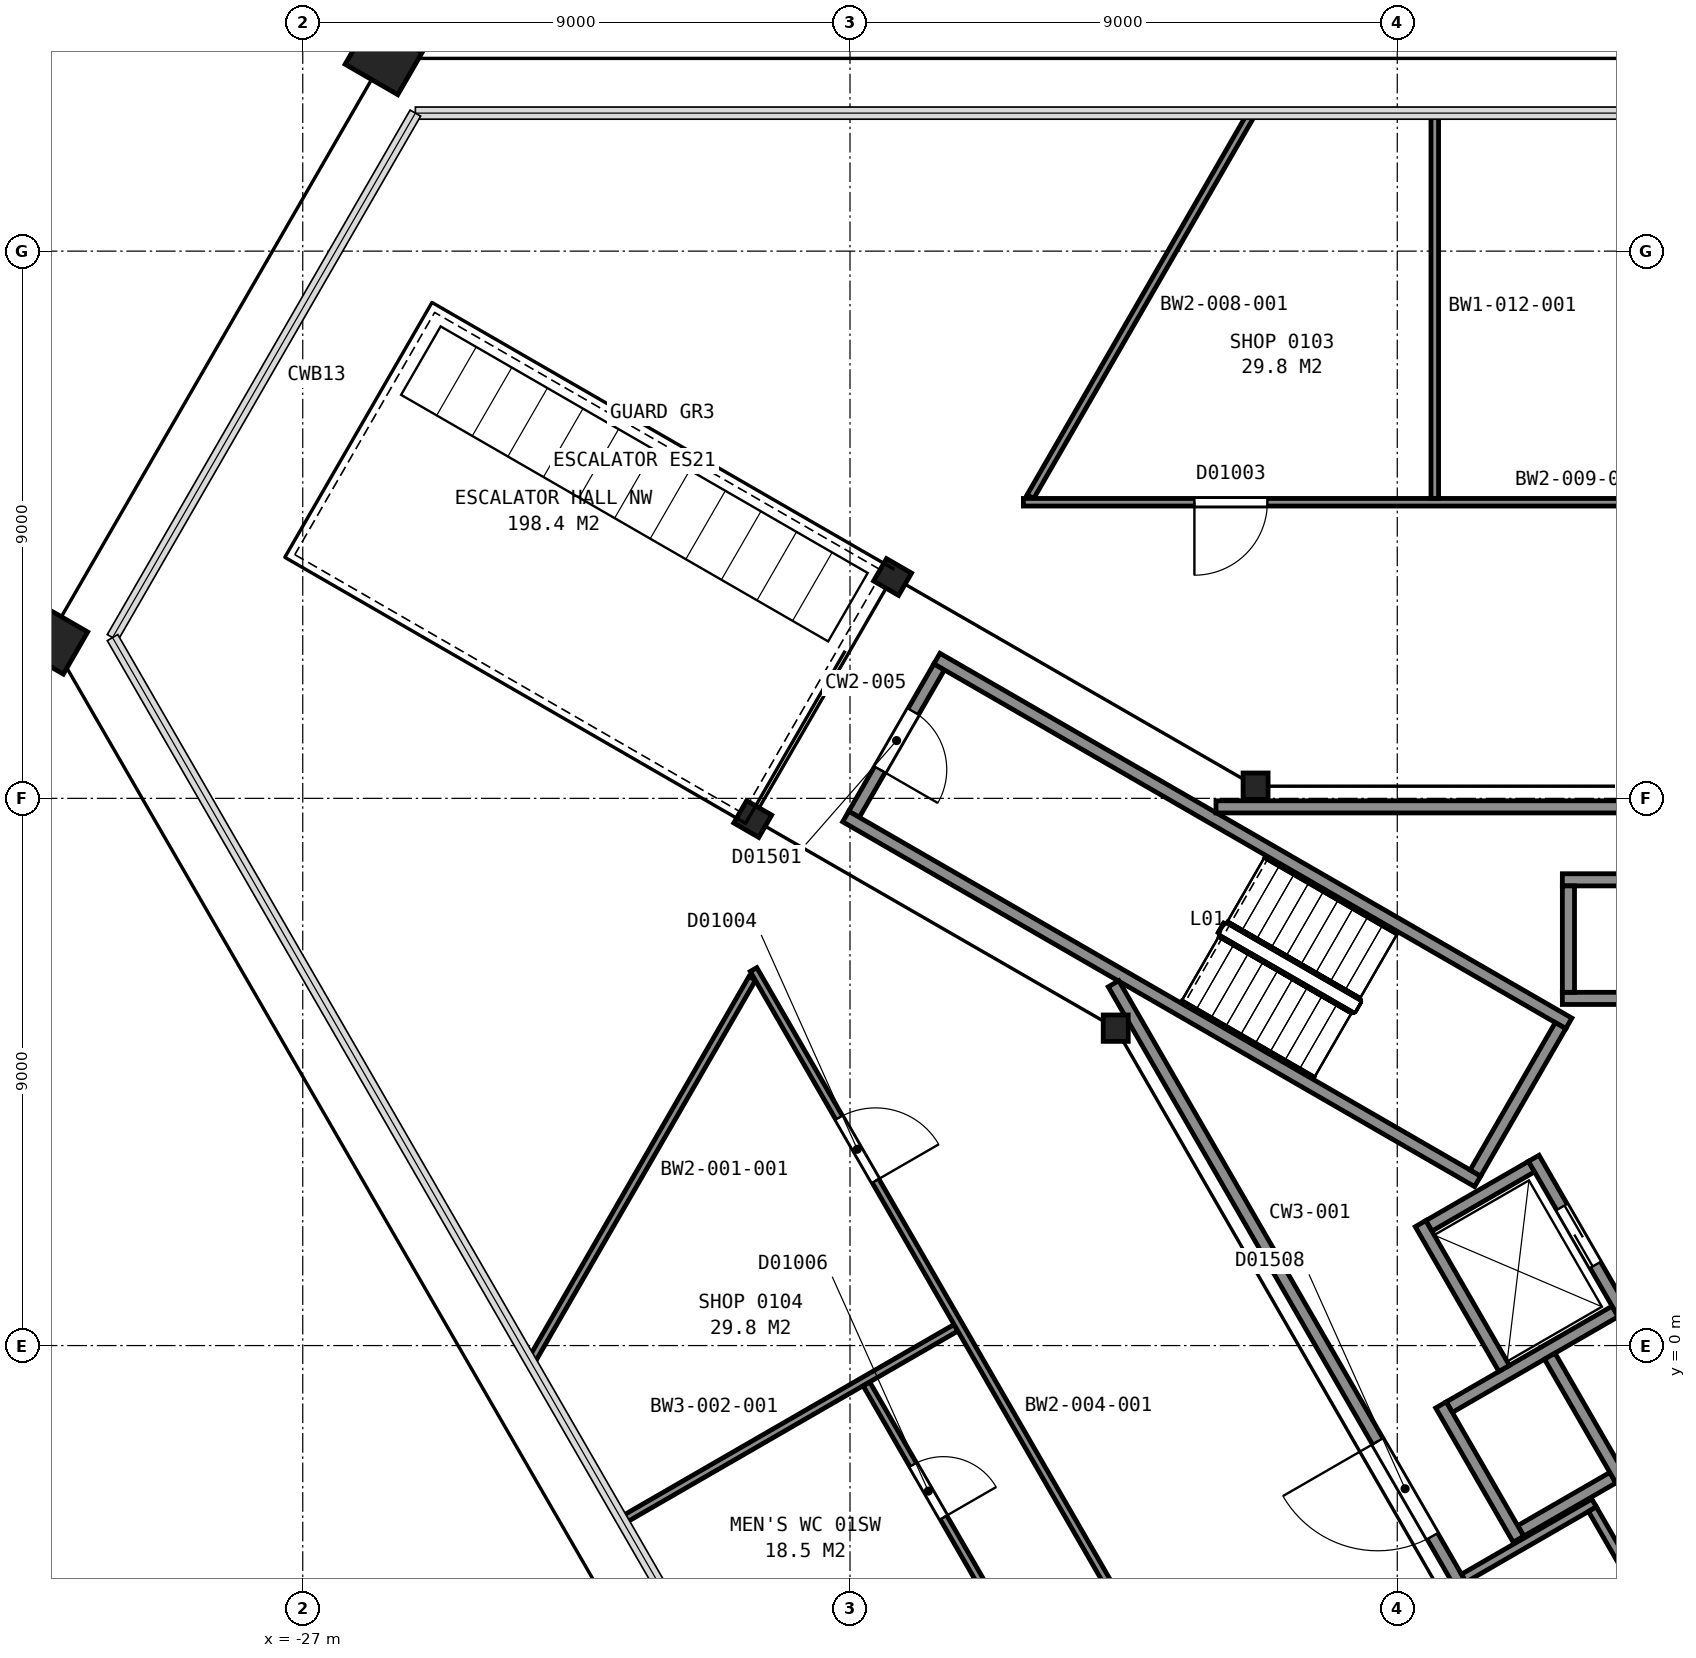
"""IFC4 building model, lengths in metres.
Left out: names, types, materials, properties, quantities, classifications, styles, units other than length and angle.
Written with IfcOpenShell. Run it as: python <this file> out.ifc"""

import sys

from ifc_helpers import new_model, si_unit, direction, frame, frame_2d, origin, origin_2d, place, context, subcontext, project, spatial, rectangle, hollow_rectangle, i_section, extrude, element, fill, save


model = new_model("IFC4")
c1 = context("Model", 3, precision=1e-05, world=origin(), true_north=direction((0.0, 1.0)))
c2 = subcontext(c1, "Body", "Model", "MODEL_VIEW")
j1 = project(units=[si_unit("LENGTHUNIT", "METRE"), si_unit("PLANEANGLEUNIT", "RADIAN")], contexts=[c1])
p1 = place(None, origin())
s1 = spatial("IfcSite", under=j1, at=p1, CompositionType="ELEMENT")
p2 = place(p1, origin())
s2 = spatial("IfcBuilding", under=s1, at=p2, CompositionType="ELEMENT")
p3 = place(p2, frame((0.0, 0.0, 12.0)))
s3 = spatial("IfcBuildingStorey", under=s2, at=p3, CompositionType="ELEMENT", Elevation=12.0)
for number, where, z_axis, x_axis in (
    (1, (-25.67, 21.17, 0.0), (0.0, 0.0, 1.0), (0.5, 0.866, 0.0)),
    (2, (-31.17, 11.64, 0.0), (0.0, 0.0, 1.0), (0.5, 0.866, 0.0)),
):
    element("IfcColumn", number, at=place(p3, frame(where, z_axis=z_axis, x_axis=x_axis)), inside=s3, PredefinedType="COLUMN", context=c2, shape_type="SweptSolid", body=[
        extrude(hollow_rectangle(XDim=0.8, YDim=1.0, WallThickness=0.075, at=origin_2d()), origin(), (0.0, 0.0, 1.0), 5.4),
    ])
p4 = place(p3, frame((-11.33, 9.2, 0.0), z_axis=(0.0, 0.0, 1.0), x_axis=(1.0, 0.0, 0.0)))
e3 = element("IfcColumn", 3, at=p4, inside=s3, PredefinedType="COLUMN", context=c2, shape_type="SweptSolid", body=[
    extrude(i_section(OverallWidth=0.411, OverallDepth=0.434, WebThickness=0.036, FlangeThickness=0.057, FilletRadius=0.015, at=origin_2d()), origin(), (0.0, 0.0, 1.0), 5.4),
])
for number, where, z_axis, x_axis in (
    (4, (-17.3, 12.64, 0.0), (0.0, 0.0, 1.0), (0.5, 0.866, 0.0)),
    (5, (-19.6, 8.66, 0.0), (0.0, 0.0, 1.0), (0.5, 0.866, 0.0)),
):
    element("IfcColumn", number, at=place(p3, frame(where, z_axis=z_axis, x_axis=x_axis)), inside=s3, PredefinedType="COLUMN", context=c2, shape_type="SweptSolid", body=[
        extrude(i_section(OverallWidth=0.424, OverallDepth=0.475, WebThickness=0.048, FlangeThickness=0.077, FilletRadius=0.015, at=origin_2d()), origin(), (0.0, 0.0, 1.0), 5.4),
    ])
p5 = place(p3, frame((-13.63, 5.22, 0.0), z_axis=(0.0, 0.0, 1.0), x_axis=(1.0, 0.0, 0.0)))
e6 = element("IfcColumn", 6, at=p5, inside=s3, PredefinedType="COLUMN", context=c2, shape_type="SweptSolid", body=[
    extrude(i_section(OverallWidth=0.411, OverallDepth=0.434, WebThickness=0.036, FlangeThickness=0.057, FilletRadius=0.015, at=origin_2d()), origin(), (0.0, 0.0, 1.0), 5.4),
])
p6 = place(p3, frame((-16.534, 11.162, 0.0), z_axis=(0.0, 0.0, 1.0), x_axis=(-0.49998411664, -0.866034573852, 0.0)))
e7 = element("IfcWall", 7, at=p6, inside=s3, PredefinedType="PARTITIONING", context=c2, shape_type="SweptSolid", body=[
    extrude(rectangle(XDim=2.8, YDim=0.2, at=frame_2d((1.4, 0.0))), origin(), (0.0, 0.0, 1.0), 5.15),
])
p7 = place(p6, frame((0.85, 0.0, 0.0)))
e8 = element("IfcOpeningElement", 8, at=p7, cuts=e7, PredefinedType="OPENING", context=c2, shape_type="SweptSolid", body=[
    extrude(rectangle(XDim=1.1, YDim=2.1, at=frame_2d((0.55, 1.05))), frame((0.0, 0.11, 0.0), z_axis=(0.0, -1.0, 0.0), x_axis=(1.0, 0.0, 0.0)), (0.0, 0.0, 1.0), 0.22),
])
for number, where, z_axis, x_axis in (
    (9, (-7.678, 2.701, 0.0), (0.0, 0.0, 1.0), (-0.866, 0.5, 0.0)),
    (10, (-6.178, 5.299, 0.0), (0.0, 0.0, 1.0), (-0.866, 0.5, 0.0)),
):
    element("IfcWall", number, at=place(p3, frame(where, z_axis=z_axis, x_axis=x_axis)), inside=s3, PredefinedType="PARTITIONING", context=c2, shape_type="SweptSolid", body=[
        extrude(rectangle(XDim=12.0, YDim=0.2, at=frame_2d((6.0, 0.0))), origin(), (0.0, 0.0, 1.0), 5.15),
    ])
p8 = place(p3, frame((-6.315, 5.262, 0.0), z_axis=(0.0, 0.0, 1.0), x_axis=(-0.500049511043, -0.865996816683, 0.0)))
e11 = element("IfcWall", 11, at=p8, inside=s3, PredefinedType="PARTITIONING", context=c2, shape_type="SweptSolid", body=[
    extrude(rectangle(XDim=2.8, YDim=0.2, at=frame_2d((1.4, 0.0))), origin(), (0.0, 0.0, 1.0), 5.15),
])
for number, where, z_axis, x_axis in (
    (12, (-6.285, 5.71, 0.0), (0.0, 0.0, 1.0), (1.0, 0.0, 0.0)),
    (13, (-6.285, 7.66, 0.0), (0.0, 0.0, 1.0), (1.0, 0.0, 0.0)),
):
    element("IfcWall", number, at=place(p3, frame(where, z_axis=z_axis, x_axis=x_axis)), inside=s3, PredefinedType="PARTITIONING", context=c2, shape_type="SweptSolid", body=[
        extrude(rectangle(XDim=2.35, YDim=0.2, at=frame_2d((1.175, 0.0))), origin(), (0.0, 0.0, 1.0), 5.4),
    ])
p9 = place(p3, frame((-6.97, -3.048, 0.0), z_axis=(0.0, 0.0, 1.0), x_axis=(0.866036909293, 0.499980071345, 0.0)))
e14 = element("IfcWall", 14, at=p9, inside=s3, PredefinedType="PARTITIONING", context=c2, shape_type="SweptSolid", body=[
    extrude(rectangle(XDim=1.75, YDim=0.2, at=frame_2d((0.875, 0.0))), origin(), (0.0, 0.0, 1.0), 5.4),
])
p10 = place(p3, frame((-8.145, -1.013, 0.0), z_axis=(0.0, 0.0, 1.0), x_axis=(0.866016494683, 0.500015430699, 0.0)))
e15 = element("IfcWall", 15, at=p10, inside=s3, PredefinedType="PARTITIONING", context=c2, shape_type="SweptSolid", body=[
    extrude(rectangle(XDim=3.15, YDim=0.2, at=frame_2d((1.575, 0.0))), origin(), (0.0, 0.0, 1.0), 5.4),
])
p11 = place(p3, frame((-8.48, 1.969, 0.0), z_axis=(0.0, 0.0, 1.0), x_axis=(0.866000020948, 0.500043961785, 0.0)))
e16 = element("IfcWall", 16, at=p11, inside=s3, PredefinedType="PARTITIONING", context=c2, shape_type="SweptSolid", body=[
    extrude(rectangle(XDim=1.95, YDim=0.2, at=frame_2d((0.975, 0.0))), origin(), (0.0, 0.0, 1.0), 5.4),
])
p12 = place(p3, frame((-6.185, 5.81, 0.0), z_axis=(0.0, 0.0, 1.0), x_axis=(0.0, 1.0, 0.0)))
e17 = element("IfcWall", 17, at=p12, inside=s3, PredefinedType="PARTITIONING", context=c2, shape_type="SweptSolid", body=[
    extrude(rectangle(XDim=1.75, YDim=0.2, at=frame_2d((0.875, 0.0))), origin(), (0.0, 0.0, 1.0), 5.4),
])
p13 = place(p3, frame((-5.28, 0.525, 0.0), z_axis=(0.0, 0.0, 1.0), x_axis=(-0.500037662692, 0.866003658127, 0.0)))
e18 = element("IfcWall", 18, at=p13, inside=s3, PredefinedType="PARTITIONING", context=c2, shape_type="SweptSolid", body=[
    extrude(rectangle(XDim=2.95, YDim=0.2, at=frame_2d((1.475, 0.0))), origin(), (0.0, 0.0, 1.0), 5.4),
])
p14 = place(p13, frame((0.925, 0.0, 0.0)))
e19 = element("IfcOpeningElement", 19, at=p14, cuts=e18, PredefinedType="OPENING", context=c2, shape_type="SweptSolid", body=[
    extrude(rectangle(XDim=1.1, YDim=2.1, at=frame_2d((0.55, 1.05))), frame((0.0, 0.11, 0.0), z_axis=(0.0, -1.0, 0.0), x_axis=(1.0, 0.0, 0.0)), (0.0, 0.0, 1.0), 0.22),
])
p15 = place(p3, frame((-5.318, -2.21, 0.0), z_axis=(0.0, 0.0, 1.0), x_axis=(-0.499938297808, 0.866061024631, 0.0)))
e20 = element("IfcWall", 20, at=p15, inside=s3, PredefinedType="PARTITIONING", context=c2, shape_type="SweptSolid", body=[
    extrude(rectangle(XDim=2.35, YDim=0.2, at=frame_2d((1.175, 0.0))), origin(), (0.0, 0.0, 1.0), 5.4),
])
p16 = place(p3, frame((-7.242, -0.376, 0.0), z_axis=(0.0, 0.0, 1.0), x_axis=(-0.499996545922, 0.866027397988, 0.0)))
e21 = element("IfcWall", 21, at=p16, inside=s3, PredefinedType="PARTITIONING", context=c2, shape_type="SweptSolid", body=[
    extrude(rectangle(XDim=2.75, YDim=0.2, at=frame_2d((1.375, 0.0))), origin(), (0.0, 0.0, 1.0), 5.4),
])
p17 = place(p3, frame((-7.006, -3.185, 0.0), z_axis=(0.0, 0.0, 1.0), x_axis=(-0.499990435942, 0.866030925526, 0.0)))
e22 = element("IfcWall", 22, at=p17, inside=s3, PredefinedType="PARTITIONING", context=c2, shape_type="SweptSolid", body=[
    extrude(rectangle(XDim=2.55, YDim=0.2, at=frame_2d((1.275, 0.0))), origin(), (0.0, 0.0, 1.0), 5.4),
])
p18 = place(p3, frame((-13.666, 5.95, 0.0), z_axis=(0.0, 0.0, 1.0), x_axis=(0.499971736997, -0.866041720822, 0.0)))
e23 = element("IfcWall", 23, at=p18, inside=s3, PredefinedType="PARTITIONING", context=c2, shape_type="SweptSolid", body=[
    extrude(rectangle(XDim=14.949, YDim=0.2, at=frame_2d((7.475, 0.0))), origin(), (0.0, 0.0, 1.0), 5.15),
])
p19 = place(p18, frame((8.69, 0.0, 0.0)))
e24 = element("IfcOpeningElement", 24, at=p19, cuts=e23, PredefinedType="OPENING", context=c2, shape_type="SweptSolid", body=[
    extrude(rectangle(XDim=1.8, YDim=2.1, at=frame_2d((0.9, 1.05))), frame((0.0, 0.11, 0.0), z_axis=(0.0, -1.0, 0.0), x_axis=(1.0, 0.0, 0.0)), (0.0, 0.0, 1.0), 0.22),
])
p20 = place(p3, frame((11.986, 8.86, 0.0), z_axis=(0.0, 0.0, 1.0), x_axis=(-1.0, 0.0, 0.0)))
e25 = element("IfcWall", 25, at=p20, inside=s3, PredefinedType="PARTITIONING", context=c2, shape_type="SweptSolid", body=[
    extrude(rectangle(XDim=23.967, YDim=0.2, at=frame_2d((11.983, 0.0))), origin(), (0.0, 0.0, 1.0), 5.15),
])
p21 = place(p20, frame((7.596, 0.0, 0.0)))
e26 = element("IfcOpeningElement", 26, at=p21, cuts=e25, PredefinedType="OPENING", context=c2, shape_type="SweptSolid", body=[
    extrude(rectangle(XDim=1.8, YDim=2.1, at=frame_2d((0.9, 1.05))), frame((0.0, 0.11, 0.0), z_axis=(0.0, -1.0, 0.0), x_axis=(1.0, 0.0, 0.0)), (0.0, 0.0, 1.0), 0.22),
])
p22 = place(p3, frame((-7.906, -3.826, 0.0), z_axis=(0.0, 0.0, 1.0), x_axis=(0.866031185235, 0.4999899861, 0.0)))
e27 = element("IfcWall", 27, at=p22, inside=s3, PredefinedType="PARTITIONING", context=c2, shape_type="SweptSolid", body=[
    extrude(rectangle(XDim=2.475, YDim=0.15, at=frame_2d((1.238, 0.0))), origin(), (0.0, 0.0, 1.0), 5.15),
])
p23 = place(p3, frame((-5.791, -2.691, 0.0), z_axis=(0.0, 0.0, 1.0), x_axis=(0.500007699544, -0.866020958405, 0.0)))
e28 = element("IfcWall", 28, at=p23, inside=s3, PredefinedType="PARTITIONING", context=c2, shape_type="SweptSolid", body=[
    extrude(rectangle(XDim=2.05, YDim=0.15, at=frame_2d((1.025, 0.0))), origin(), (0.0, 0.0, 1.0), 5.15),
])
p24 = place(p3, frame((-23.25, -0.27, 0.0), z_axis=(0.0, 0.0, 1.0), x_axis=(0.500002873931, 0.866023744513, 0.0)))
e29 = element("IfcWall", 29, at=p24, inside=s3, PredefinedType="PARTITIONING", context=c2, shape_type="SweptSolid", body=[
    extrude(rectangle(XDim=7.285, YDim=0.125, at=frame_2d((3.643, 0.0))), origin(), (0.0, 0.0, 1.0), 5.24),
])
p25 = place(p3, frame((-21.746, -2.875, 0.0), z_axis=(0.0, 0.0, 1.0), x_axis=(0.866118237319, 0.499839173118, 0.0)))
e30 = element("IfcWall", 30, at=p25, inside=s3, PredefinedType="PARTITIONING", context=c2, shape_type="SweptSolid", body=[
    extrude(rectangle(XDim=6.337, YDim=0.125, at=frame_2d((3.169, 0.0))), origin(), (0.0, 0.0, 1.0), 4.253),
])
p26 = place(p3, frame((-4.438, -20.054, 0.0), z_axis=(0.0, 0.0, 1.0), x_axis=(-0.499994028088, 0.866028851642, 0.0)))
e31 = element("IfcWall", 31, at=p26, inside=s3, PredefinedType="PARTITIONING", context=c2, shape_type="SweptSolid", body=[
    extrude(rectangle(XDim=30.297, YDim=0.125, at=frame_2d((15.148, 0.0))), origin(), (0.0, 0.0, 1.0), 4.253),
])
p27 = place(p26, frame((26.285, 0.0, 0.0)))
e32 = element("IfcOpeningElement", 32, at=p27, cuts=e31, PredefinedType="OPENING", context=c2, shape_type="SweptSolid", body=[
    extrude(rectangle(XDim=1.2, YDim=2.1, at=frame_2d((0.6, 1.05))), frame((0.0, 0.073, 0.0), z_axis=(0.0, -1.0, 0.0), x_axis=(1.0, 0.0, 0.0)), (0.0, 0.0, 1.0), 0.145),
])
p28 = place(p26, frame((16.731, 0.0, 0.0)))
e33 = element("IfcOpeningElement", 33, at=p28, cuts=e31, PredefinedType="OPENING", context=c2, shape_type="SweptSolid", body=[
    extrude(rectangle(XDim=1.0, YDim=2.1, at=frame_2d((0.5, 1.05))), frame((0.0, 0.073, 0.0), z_axis=(0.0, -1.0, 0.0), x_axis=(1.0, 0.0, 0.0)), (0.0, 0.0, 1.0), 0.145),
])
p29 = place(p26, frame((8.257, 0.0, 0.0)))
e34 = element("IfcOpeningElement", 34, at=p29, cuts=e31, PredefinedType="OPENING", context=c2, shape_type="SweptSolid", body=[
    extrude(rectangle(XDim=1.2, YDim=2.1, at=frame_2d((0.6, 1.05))), frame((0.0, 0.073, 0.0), z_axis=(0.0, -1.0, 0.0), x_axis=(1.0, 0.0, 0.0)), (0.0, 0.0, 1.0), 0.145),
])
p30 = place(p26, frame((2.916, 0.0, 0.0)))
e35 = element("IfcOpeningElement", 35, at=p30, cuts=e31, PredefinedType="OPENING", context=c2, shape_type="SweptSolid", body=[
    extrude(rectangle(XDim=1.0, YDim=2.1, at=frame_2d((0.5, 1.05))), frame((0.0, 0.073, 0.0), z_axis=(0.0, -1.0, 0.0), x_axis=(1.0, 0.0, 0.0)), (0.0, 0.0, 1.0), 0.145),
])
p31 = place(p3, frame((-11.506, -11.411, 0.0), z_axis=(0.0, 0.0, 1.0), x_axis=(-0.499977189168, 0.866038573224, 0.0)))
e36 = element("IfcWall", 36, at=p31, inside=s3, PredefinedType="PARTITIONING", context=c2, shape_type="SweptSolid", body=[
    extrude(rectangle(XDim=12.444, YDim=0.125, at=frame_2d((6.222, 0.0))), origin(), (0.0, 0.0, 1.0), 5.24),
])
p32 = place(p31, frame((9.912, 0.0, 0.0)))
e37 = element("IfcOpeningElement", 37, at=p32, cuts=e36, PredefinedType="OPENING", context=c2, shape_type="SweptSolid", body=[
    extrude(rectangle(XDim=1.0, YDim=2.1, at=frame_2d((0.5, 1.05))), frame((0.0, 0.073, 0.0), z_axis=(0.0, -1.0, 0.0), x_axis=(1.0, 0.0, 0.0)), (0.0, 0.0, 1.0), 0.145),
])
p33 = place(p31, frame((5.72, 0.0, 0.0)))
e38 = element("IfcOpeningElement", 38, at=p33, cuts=e36, PredefinedType="OPENING", context=c2, shape_type="SweptSolid", body=[
    extrude(rectangle(XDim=1.0, YDim=2.1, at=frame_2d((0.5, 1.05))), frame((0.0, 0.073, 0.0), z_axis=(0.0, -1.0, 0.0), x_axis=(1.0, 0.0, 0.0)), (0.0, 0.0, 1.0), 0.145),
])
p34 = place(p31, frame((1.529, 0.0, 0.0)))
e39 = element("IfcOpeningElement", 39, at=p34, cuts=e36, PredefinedType="OPENING", context=c2, shape_type="SweptSolid", body=[
    extrude(rectangle(XDim=1.0, YDim=2.1, at=frame_2d((0.5, 1.05))), frame((0.0, 0.073, 0.0), z_axis=(0.0, -1.0, 0.0), x_axis=(1.0, 0.0, 0.0)), (0.0, 0.0, 1.0), 0.145),
])
p35 = place(p3, frame((-15.033, 13.961, 0.0), z_axis=(0.0, 0.0, 1.0), x_axis=(0.499977739203, 0.86603825568, 0.0)))
e40 = element("IfcWall", 40, at=p35, inside=s3, PredefinedType="PARTITIONING", context=c2, shape_type="SweptSolid", body=[
    extrude(rectangle(XDim=7.285, YDim=0.125, at=frame_2d((3.643, 0.0))), origin(), (0.0, 0.0, 1.0), 5.24),
])
p36 = place(p3, frame((-15.148, 13.87, 0.0), z_axis=(0.0, 0.0, 1.0), x_axis=(1.0, 0.0, 0.0)))
e41 = element("IfcWall", 41, at=p36, inside=s3, PredefinedType="PARTITIONING", context=c2, shape_type="SweptSolid", body=[
    extrude(rectangle(XDim=30.297, YDim=0.125, at=frame_2d((15.148, 0.0))), origin(), (0.0, 0.0, 1.0), 4.253),
])
p37 = place(p36, frame((26.281, 0.0, 0.0)))
e42 = element("IfcOpeningElement", 42, at=p37, cuts=e41, PredefinedType="OPENING", context=c2, shape_type="SweptSolid", body=[
    extrude(rectangle(XDim=1.2, YDim=2.1, at=frame_2d((0.6, 1.05))), frame((0.0, 0.073, 0.0), z_axis=(0.0, -1.0, 0.0), x_axis=(1.0, 0.0, 0.0)), (0.0, 0.0, 1.0), 0.145),
])
p38 = place(p36, frame((14.265, 0.0, 0.0)))
e43 = element("IfcOpeningElement", 43, at=p38, cuts=e41, PredefinedType="OPENING", context=c2, shape_type="SweptSolid", body=[
    extrude(rectangle(XDim=1.8, YDim=2.4, at=frame_2d((0.9, 1.2))), frame((0.0, 0.073, 0.0), z_axis=(0.0, -1.0, 0.0), x_axis=(1.0, 0.0, 0.0)), (0.0, 0.0, 1.0), 0.145),
])
p39 = place(p36, frame((2.812, 0.0, 0.0)))
e44 = element("IfcOpeningElement", 44, at=p39, cuts=e41, PredefinedType="OPENING", context=c2, shape_type="SweptSolid", body=[
    extrude(rectangle(XDim=1.2, YDim=2.1, at=frame_2d((0.6, 1.05))), frame((0.0, 0.073, 0.0), z_axis=(0.0, -1.0, 0.0), x_axis=(1.0, 0.0, 0.0)), (0.0, 0.0, 1.0), 0.145),
])
p40 = place(p3, frame((-8.383, 13.933, 0.0), z_axis=(0.0, 0.0, 1.0), x_axis=(0.0, 1.0, 0.0)))
e45 = element("IfcWall", 45, at=p40, inside=s3, PredefinedType="PARTITIONING", context=c2, shape_type="SweptSolid", body=[
    extrude(rectangle(XDim=6.337, YDim=0.125, at=frame_2d((3.169, 0.0))), origin(), (0.0, 0.0, 1.0), 4.253),
])
p41 = place(p7, origin())
e46 = element("IfcDoor", 46, at=p41, inside=s3, OperationType="SINGLE_SWING_RIGHT", PredefinedType="DOOR", context=c2, shape_type="SweptSolid", body=[
    extrude(rectangle(XDim=1.1, YDim=2.1, at=frame_2d((0.55, 1.05))), frame((0.0, 0.025, 0.0), z_axis=(0.0, -1.0, 0.0), x_axis=(1.0, 0.0, 0.0)), (0.0, 0.0, 1.0), 0.05),
])
fill(e8, e46)
p42 = place(p14, origin())
e47 = element("IfcDoor", 47, at=p42, inside=s3, OperationType="SLIDING_TO_LEFT", PredefinedType="DOOR", context=c2, shape_type="SweptSolid", body=[
    extrude(rectangle(XDim=1.1, YDim=2.1, at=frame_2d((0.55, 1.05))), frame((0.0, 0.025, 0.0), z_axis=(0.0, -1.0, 0.0), x_axis=(1.0, 0.0, 0.0)), (0.0, 0.0, 1.0), 0.05),
])
fill(e19, e47)
p43 = place(p19, origin())
e48 = element("IfcDoor", 48, at=p43, inside=s3, OperationType="DOUBLE_DOOR_SINGLE_SWING", PredefinedType="DOOR", context=c2, shape_type="SweptSolid", body=[
    extrude(rectangle(XDim=1.8, YDim=2.1, at=frame_2d((0.9, 1.05))), frame((0.0, 0.025, 0.0), z_axis=(0.0, -1.0, 0.0), x_axis=(1.0, 0.0, 0.0)), (0.0, 0.0, 1.0), 0.05),
])
fill(e24, e48)
p44 = place(p27, origin())
e49 = element("IfcDoor", 49, at=p44, inside=s3, OperationType="SINGLE_SWING_LEFT", PredefinedType="DOOR", context=c2, shape_type="SweptSolid", body=[
    extrude(rectangle(XDim=1.2, YDim=2.1, at=frame_2d((0.6, 1.05))), frame((0.0, 0.025, 0.0), z_axis=(0.0, -1.0, 0.0), x_axis=(1.0, 0.0, 0.0)), (0.0, 0.0, 1.0), 0.05),
])
fill(e32, e49)
p45 = place(p32, origin())
e50 = element("IfcDoor", 50, at=p45, inside=s3, OperationType="SINGLE_SWING_LEFT", PredefinedType="DOOR", context=c2, shape_type="SweptSolid", body=[
    extrude(rectangle(XDim=1.0, YDim=2.1, at=frame_2d((0.5, 1.05))), frame((0.0, 0.025, 0.0), z_axis=(0.0, -1.0, 0.0), x_axis=(1.0, 0.0, 0.0)), (0.0, 0.0, 1.0), 0.05),
])
fill(e37, e50)
p46 = place(p39, origin())
e51 = element("IfcDoor", 51, at=p46, inside=s3, OperationType="SINGLE_SWING_LEFT", PredefinedType="DOOR", context=c2, shape_type="SweptSolid", body=[
    extrude(rectangle(XDim=1.2, YDim=2.1, at=frame_2d((0.6, 1.05))), frame((0.0, 0.025, 0.0), z_axis=(0.0, -1.0, 0.0), x_axis=(1.0, 0.0, 0.0)), (0.0, 0.0, 1.0), 0.05),
])
fill(e44, e51)
save(model, sys.argv[1])
